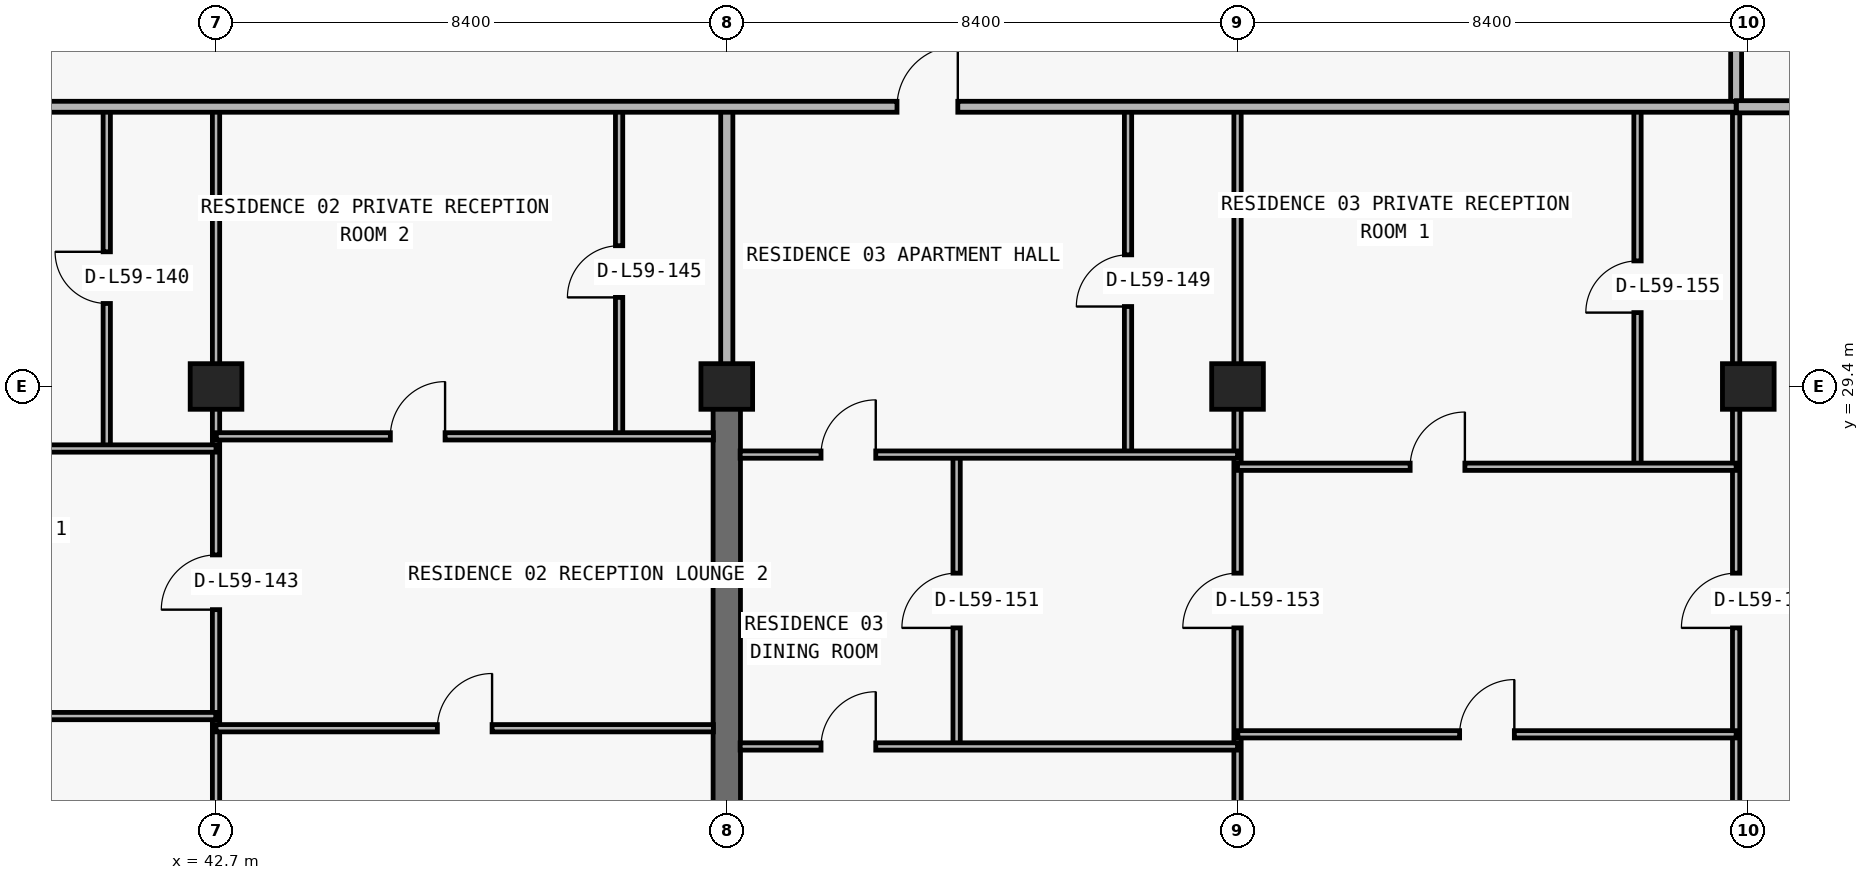
"""IFC4 building model, lengths in metres.
Left out: names, types, materials, properties, quantities, classifications, styles, units other than length and angle.
Written with IfcOpenShell. Run it as: python <this file> out.ifc"""

import sys

from ifc_helpers import new_model, si_unit, direction, frame, frame_2d, origin, origin_2d, place, context, subcontext, project, spatial, rectangle, extrude, element, fill, save


model = new_model("IFC4")
c1 = context("Model", 3, precision=1e-05, world=origin(), true_north=direction((0.0, 1.0)))
c2 = subcontext(c1, "Body", "Model", "MODEL_VIEW")
j1 = project(units=[si_unit("LENGTHUNIT", "METRE"), si_unit("PLANEANGLEUNIT", "RADIAN")], contexts=[c1])
p1 = place(None, origin())
s1 = spatial("IfcSite", under=j1, at=p1, CompositionType="ELEMENT")
p2 = place(p1, origin())
s2 = spatial("IfcBuilding", under=s1, at=p2, CompositionType="ELEMENT")
p3 = place(p2, frame((0.0, 0.0, 211.5)))
s3 = spatial("IfcBuildingStorey", under=s2, at=p3, CompositionType="ELEMENT", Elevation=211.5)
for number, where, z_axis, x_axis in (
    (1, (42.7, 29.4, 0.0), (0.0, 0.0, 1.0), (1.0, 0.0, 0.0)),
    (2, (51.1, 29.4, 0.0), (0.0, 0.0, 1.0), (1.0, 0.0, 0.0)),
    (3, (59.5, 29.4, 0.0), (0.0, 0.0, 1.0), (1.0, 0.0, 0.0)),
    (4, (67.9, 29.4, 0.0), (0.0, 0.0, 1.0), (1.0, 0.0, 0.0)),
):
    element("IfcColumn", number, at=place(p3, frame(where, z_axis=z_axis, x_axis=x_axis)), inside=s3, PredefinedType="COLUMN", context=c2, shape_type="SweptSolid", body=[
        extrude(rectangle(XDim=0.85, YDim=0.75, at=origin_2d()), origin(), (0.0, 0.0, 1.0), 3.05),
    ])
p4 = place(p3, frame((51.1, 20.8, 0.0), z_axis=(0.0, 0.0, 1.0), x_axis=(0.0, 1.0, 0.0)))
e5 = element("IfcWall", 5, at=p4, inside=s3, PredefinedType="SHEAR", context=c2, shape_type="SweptSolid", body=[
    extrude(rectangle(XDim=8.6, YDim=0.45, at=frame_2d((4.3, 0.0))), origin(), (0.0, 0.0, 1.0), 3.05),
])
p5 = place(p3, frame((40.903, 28.38, 0.0), z_axis=(0.0, 0.0, 1.0), x_axis=(0.0, 1.0, 0.0)))
e6 = element("IfcWall", 6, at=p5, inside=s3, PredefinedType="PARTITIONING", context=c2, shape_type="SweptSolid", body=[
    extrude(rectangle(XDim=5.62, YDim=0.12, at=frame_2d((2.81, 0.0))), origin(), (0.0, 0.0, 1.0), 3.05),
])
p6 = place(p5, frame((2.385, 0.0, 0.0)))
e7 = element("IfcOpeningElement", 7, at=p6, cuts=e6, PredefinedType="OPENING", context=c2, shape_type="SweptSolid", body=[
    extrude(rectangle(XDim=0.85, YDim=2.1, at=frame_2d((0.425, 1.05))), frame((0.0, 0.07, 0.0), z_axis=(0.0, -1.0, 0.0), x_axis=(1.0, 0.0, 0.0)), (0.0, 0.0, 1.0), 0.14),
])
p7 = place(p3, frame((42.7, 11.24, 0.0), z_axis=(0.0, 0.0, 1.0), x_axis=(0.0, 1.0, 0.0)))
e8 = element("IfcWall", 8, at=p7, inside=s3, PredefinedType="PARTITIONING", context=c2, shape_type="SweptSolid", body=[
    extrude(rectangle(XDim=22.76, YDim=0.12, at=frame_2d((11.38, 0.0))), origin(), (0.0, 0.0, 1.0), 2.263),
])
p8 = place(p7, frame((14.49, 0.0, 0.0)))
e9 = element("IfcOpeningElement", 9, at=p8, cuts=e8, PredefinedType="OPENING", context=c2, shape_type="SweptSolid", body=[
    extrude(rectangle(XDim=0.9, YDim=2.15, at=frame_2d((0.45, 1.075))), frame((0.0, 0.07, 0.0), z_axis=(0.0, -1.0, 0.0), x_axis=(1.0, 0.0, 0.0)), (0.0, 0.0, 1.0), 0.14),
])
p9 = place(p3, frame((49.329, 28.58, 0.0), z_axis=(0.0, 0.0, 1.0), x_axis=(0.0, 1.0, 0.0)))
e10 = element("IfcWall", 10, at=p9, inside=s3, PredefinedType="PARTITIONING", context=c2, shape_type="SweptSolid", body=[
    extrude(rectangle(XDim=5.42, YDim=0.12, at=frame_2d((2.71, 0.0))), origin(), (0.0, 0.0, 1.0), 3.05),
])
p10 = place(p9, frame((2.285, 0.0, 0.0)))
e11 = element("IfcOpeningElement", 11, at=p10, cuts=e10, PredefinedType="OPENING", context=c2, shape_type="SweptSolid", body=[
    extrude(rectangle(XDim=0.85, YDim=2.1, at=frame_2d((0.425, 1.05))), frame((0.0, 0.07, 0.0), z_axis=(0.0, -1.0, 0.0), x_axis=(1.0, 0.0, 0.0)), (0.0, 0.0, 1.0), 0.14),
])
p11 = place(p3, frame((51.1, 29.405, 0.0), z_axis=(0.0, 0.0, 1.0), x_axis=(0.0, 1.0, 0.0)))
e12 = element("IfcWall", 12, at=p11, inside=s3, PredefinedType="PARTITIONING", context=c2, shape_type="SweptSolid", body=[
    extrude(rectangle(XDim=4.595, YDim=0.2, at=frame_2d((2.297, 0.0))), origin(), (0.0, 0.0, 1.0), 2.335),
])
p12 = place(p3, frame((54.88, 23.48, 0.0), z_axis=(0.0, 0.0, 1.0), x_axis=(0.0, 1.0, 0.0)))
e13 = element("IfcWall", 13, at=p12, inside=s3, PredefinedType="PARTITIONING", context=c2, shape_type="SweptSolid", body=[
    extrude(rectangle(XDim=4.8, YDim=0.12, at=frame_2d((2.4, 0.0))), origin(), (0.0, 0.0, 1.0), 3.05),
])
p13 = place(p12, frame((1.95, 0.0, 0.0)))
e14 = element("IfcOpeningElement", 14, at=p13, cuts=e13, PredefinedType="OPENING", context=c2, shape_type="SweptSolid", body=[
    extrude(rectangle(XDim=0.9, YDim=2.15, at=frame_2d((0.45, 1.075))), frame((0.0, 0.07, 0.0), z_axis=(0.0, -1.0, 0.0), x_axis=(1.0, 0.0, 0.0)), (0.0, 0.0, 1.0), 0.14),
])
p14 = place(p3, frame((57.699, 28.28, 0.0), z_axis=(0.0, 0.0, 1.0), x_axis=(0.0, 1.0, 0.0)))
e15 = element("IfcWall", 15, at=p14, inside=s3, PredefinedType="PARTITIONING", context=c2, shape_type="SweptSolid", body=[
    extrude(rectangle(XDim=5.72, YDim=0.12, at=frame_2d((2.86, 0.0))), origin(), (0.0, 0.0, 1.0), 3.05),
])
p15 = place(p14, frame((2.435, 0.0, 0.0)))
e16 = element("IfcOpeningElement", 16, at=p15, cuts=e15, PredefinedType="OPENING", context=c2, shape_type="SweptSolid", body=[
    extrude(rectangle(XDim=0.85, YDim=2.1, at=frame_2d((0.425, 1.05))), frame((0.0, 0.07, 0.0), z_axis=(0.0, -1.0, 0.0), x_axis=(1.0, 0.0, 0.0)), (0.0, 0.0, 1.0), 0.14),
])
p16 = place(p3, frame((59.5, 11.24, 0.0), z_axis=(0.0, 0.0, 1.0), x_axis=(0.0, 1.0, 0.0)))
e17 = element("IfcWall", 17, at=p16, inside=s3, PredefinedType="PARTITIONING", context=c2, shape_type="SweptSolid", body=[
    extrude(rectangle(XDim=22.76, YDim=0.12, at=frame_2d((11.38, 0.0))), origin(), (0.0, 0.0, 1.0), 2.263),
])
p17 = place(p16, frame((14.19, 0.0, 0.0)))
e18 = element("IfcOpeningElement", 18, at=p17, cuts=e17, PredefinedType="OPENING", context=c2, shape_type="SweptSolid", body=[
    extrude(rectangle(XDim=0.9, YDim=2.15, at=frame_2d((0.45, 1.075))), frame((0.0, 0.07, 0.0), z_axis=(0.0, -1.0, 0.0), x_axis=(1.0, 0.0, 0.0)), (0.0, 0.0, 1.0), 0.14),
])
p18 = place(p3, frame((66.078, 28.08, 0.0), z_axis=(0.0, 0.0, 1.0), x_axis=(0.0, 1.0, 0.0)))
e19 = element("IfcWall", 19, at=p18, inside=s3, PredefinedType="PARTITIONING", context=c2, shape_type="SweptSolid", body=[
    extrude(rectangle(XDim=5.92, YDim=0.12, at=frame_2d((2.96, 0.0))), origin(), (0.0, 0.0, 1.0), 3.05),
])
p19 = place(p18, frame((2.535, 0.0, 0.0)))
e20 = element("IfcOpeningElement", 20, at=p19, cuts=e19, PredefinedType="OPENING", context=c2, shape_type="SweptSolid", body=[
    extrude(rectangle(XDim=0.85, YDim=2.1, at=frame_2d((0.425, 1.05))), frame((0.0, 0.07, 0.0), z_axis=(0.0, -1.0, 0.0), x_axis=(1.0, 0.0, 0.0)), (0.0, 0.0, 1.0), 0.14),
])
p20 = place(p3, frame((67.7, 11.32, 0.0), z_axis=(0.0, 0.0, 1.0), x_axis=(0.0, 1.0, 0.0)))
e21 = element("IfcWall", 21, at=p20, inside=s3, PredefinedType="PARTITIONING", context=c2, shape_type="SweptSolid", body=[
    extrude(rectangle(XDim=22.68, YDim=0.12, at=frame_2d((11.34, 0.0))), origin(), (0.0, 0.0, 1.0), 2.263),
])
p21 = place(p20, frame((14.11, 0.0, 0.0)))
e22 = element("IfcOpeningElement", 22, at=p21, cuts=e21, PredefinedType="OPENING", context=c2, shape_type="SweptSolid", body=[
    extrude(rectangle(XDim=0.9, YDim=2.15, at=frame_2d((0.45, 1.075))), frame((0.0, 0.07, 0.0), z_axis=(0.0, -1.0, 0.0), x_axis=(1.0, 0.0, 0.0)), (0.0, 0.0, 1.0), 0.14),
])
p22 = place(p3, frame((67.7, 34.005, 0.0), z_axis=(0.0, 0.0, 1.0), x_axis=(0.0, 1.0, 0.0)))
e23 = element("IfcWall", 23, at=p22, inside=s3, PredefinedType="PARTITIONING", context=c2, shape_type="SweptSolid", body=[
    extrude(rectangle(XDim=2.995, YDim=0.18, at=frame_2d((1.498, 0.0))), origin(), (0.0, 0.0, 1.0), 2.263),
])
p23 = place(p3, frame((51.32, 23.48, 0.0), z_axis=(0.0, 0.0, 1.0), x_axis=(1.0, 0.0, 0.0)))
e24 = element("IfcWall", 24, at=p23, inside=s3, PredefinedType="PARTITIONING", context=c2, shape_type="SweptSolid", body=[
    extrude(rectangle(XDim=8.18, YDim=0.12, at=frame_2d((4.09, 0.0))), origin(), (0.0, 0.0, 1.0), 3.05),
])
p24 = place(p23, frame((1.33, 0.0, 0.0)))
e25 = element("IfcOpeningElement", 25, at=p24, cuts=e24, PredefinedType="OPENING", context=c2, shape_type="SweptSolid", body=[
    extrude(rectangle(XDim=0.9, YDim=2.15, at=frame_2d((0.45, 1.075))), frame((0.0, 0.07, 0.0), z_axis=(0.0, -1.0, 0.0), x_axis=(1.0, 0.0, 0.0)), (0.0, 0.0, 1.0), 0.14),
])
p25 = place(p3, frame((59.505, 23.68, 0.0), z_axis=(0.0, 0.0, 1.0), x_axis=(1.0, 0.0, 0.0)))
e26 = element("IfcWall", 26, at=p25, inside=s3, PredefinedType="PARTITIONING", context=c2, shape_type="SweptSolid", body=[
    extrude(rectangle(XDim=8.195, YDim=0.12, at=frame_2d((4.098, 0.0))), origin(), (0.0, 0.0, 1.0), 3.05),
])
p26 = place(p25, frame((3.647, 0.0, 0.0)))
e27 = element("IfcOpeningElement", 27, at=p26, cuts=e26, PredefinedType="OPENING", context=c2, shape_type="SweptSolid", body=[
    extrude(rectangle(XDim=0.9, YDim=2.15, at=frame_2d((0.45, 1.075))), frame((0.0, 0.07, 0.0), z_axis=(0.0, -1.0, 0.0), x_axis=(1.0, 0.0, 0.0)), (0.0, 0.0, 1.0), 0.14),
])
p27 = place(p3, frame((42.7, 23.78, 0.0), z_axis=(0.0, 0.0, 1.0), x_axis=(1.0, 0.0, 0.0)))
e28 = element("IfcWall", 28, at=p27, inside=s3, PredefinedType="PARTITIONING", context=c2, shape_type="SweptSolid", body=[
    extrude(rectangle(XDim=8.18, YDim=0.12, at=frame_2d((4.09, 0.0))), origin(), (0.0, 0.0, 1.0), 3.05),
])
p28 = place(p27, frame((3.64, 0.0, 0.0)))
e29 = element("IfcOpeningElement", 29, at=p28, cuts=e28, PredefinedType="OPENING", context=c2, shape_type="SweptSolid", body=[
    extrude(rectangle(XDim=0.9, YDim=2.15, at=frame_2d((0.45, 1.075))), frame((0.0, 0.07, 0.0), z_axis=(0.0, -1.0, 0.0), x_axis=(1.0, 0.0, 0.0)), (0.0, 0.0, 1.0), 0.14),
])
p29 = place(p3, frame((35.105, 23.98, 0.0), z_axis=(0.0, 0.0, 1.0), x_axis=(1.0, 0.0, 0.0)))
e30 = element("IfcWall", 30, at=p29, inside=s3, PredefinedType="PARTITIONING", context=c2, shape_type="SweptSolid", body=[
    extrude(rectangle(XDim=7.59, YDim=0.12, at=frame_2d((3.795, 0.0))), origin(), (0.0, 0.0, 1.0), 3.05),
])
p30 = place(p29, frame((3.345, 0.0, 0.0)))
e31 = element("IfcOpeningElement", 31, at=p30, cuts=e30, PredefinedType="OPENING", context=c2, shape_type="SweptSolid", body=[
    extrude(rectangle(XDim=0.9, YDim=2.15, at=frame_2d((0.45, 1.075))), frame((0.0, 0.07, 0.0), z_axis=(0.0, -1.0, 0.0), x_axis=(1.0, 0.0, 0.0)), (0.0, 0.0, 1.0), 0.14),
])
p31 = place(p3, frame((59.5, 28.08, 0.0), z_axis=(0.0, 0.0, 1.0), x_axis=(1.0, 0.0, 0.0)))
e32 = element("IfcWall", 32, at=p31, inside=s3, PredefinedType="PARTITIONING", context=c2, shape_type="SweptSolid", body=[
    extrude(rectangle(XDim=8.2, YDim=0.12, at=frame_2d((4.1, 0.0))), origin(), (0.0, 0.0, 1.0), 3.05),
])
p32 = place(p31, frame((2.839, 0.0, 0.0)))
e33 = element("IfcOpeningElement", 33, at=p32, cuts=e32, PredefinedType="OPENING", context=c2, shape_type="SweptSolid", body=[
    extrude(rectangle(XDim=0.9, YDim=2.15, at=frame_2d((0.45, 1.075))), frame((0.0, 0.07, 0.0), z_axis=(0.0, -1.0, 0.0), x_axis=(1.0, 0.0, 0.0)), (0.0, 0.0, 1.0), 0.14),
])
p33 = place(p3, frame((51.32, 28.28, 0.0), z_axis=(0.0, 0.0, 1.0), x_axis=(1.0, 0.0, 0.0)))
e34 = element("IfcWall", 34, at=p33, inside=s3, PredefinedType="PARTITIONING", context=c2, shape_type="SweptSolid", body=[
    extrude(rectangle(XDim=8.18, YDim=0.12, at=frame_2d((4.09, 0.0))), origin(), (0.0, 0.0, 1.0), 3.05),
])
p34 = place(p33, frame((1.33, 0.0, 0.0)))
e35 = element("IfcOpeningElement", 35, at=p34, cuts=e34, PredefinedType="OPENING", context=c2, shape_type="SweptSolid", body=[
    extrude(rectangle(XDim=0.9, YDim=2.15, at=frame_2d((0.45, 1.075))), frame((0.0, 0.07, 0.0), z_axis=(0.0, -1.0, 0.0), x_axis=(1.0, 0.0, 0.0)), (0.0, 0.0, 1.0), 0.14),
])
p35 = place(p3, frame((35.1, 28.38, 0.0), z_axis=(0.0, 0.0, 1.0), x_axis=(1.0, 0.0, 0.0)))
e36 = element("IfcWall", 36, at=p35, inside=s3, PredefinedType="PARTITIONING", context=c2, shape_type="SweptSolid", body=[
    extrude(rectangle(XDim=7.6, YDim=0.12, at=frame_2d((3.8, 0.0))), origin(), (0.0, 0.0, 1.0), 3.05),
])
p36 = place(p35, frame((2.451, 0.0, 0.0)))
e37 = element("IfcOpeningElement", 37, at=p36, cuts=e36, PredefinedType="OPENING", context=c2, shape_type="SweptSolid", body=[
    extrude(rectangle(XDim=0.9, YDim=2.15, at=frame_2d((0.45, 1.075))), frame((0.0, 0.07, 0.0), z_axis=(0.0, -1.0, 0.0), x_axis=(1.0, 0.0, 0.0)), (0.0, 0.0, 1.0), 0.14),
])
p37 = place(p3, frame((42.705, 28.58, 0.0), z_axis=(0.0, 0.0, 1.0), x_axis=(1.0, 0.0, 0.0)))
e38 = element("IfcWall", 38, at=p37, inside=s3, PredefinedType="PARTITIONING", context=c2, shape_type="SweptSolid", body=[
    extrude(rectangle(XDim=8.175, YDim=0.12, at=frame_2d((4.087, 0.0))), origin(), (0.0, 0.0, 1.0), 3.05),
])
p38 = place(p37, frame((2.862, 0.0, 0.0)))
e39 = element("IfcOpeningElement", 39, at=p38, cuts=e38, PredefinedType="OPENING", context=c2, shape_type="SweptSolid", body=[
    extrude(rectangle(XDim=0.9, YDim=2.15, at=frame_2d((0.45, 1.075))), frame((0.0, 0.07, 0.0), z_axis=(0.0, -1.0, 0.0), x_axis=(1.0, 0.0, 0.0)), (0.0, 0.0, 1.0), 0.14),
])
p39 = place(p3, frame((26.7, 34.0, 0.0), z_axis=(0.0, 0.0, 1.0), x_axis=(1.0, 0.0, 0.0)))
e40 = element("IfcWall", 40, at=p39, inside=s3, PredefinedType="PARTITIONING", context=c2, shape_type="SweptSolid", body=[
    extrude(rectangle(XDim=41.0, YDim=0.18, at=frame_2d((20.5, 0.0))), origin(), (0.0, 0.0, 1.0), 3.05),
])
p40 = place(p39, frame((2.796, 0.0, 0.0)))
e41 = element("IfcOpeningElement", 41, at=p40, cuts=e40, PredefinedType="OPENING", context=c2, shape_type="SweptSolid", body=[
    extrude(rectangle(XDim=1.0, YDim=2.2, at=frame_2d((0.5, 1.1))), frame((0.0, 0.1, 0.0), z_axis=(0.0, -1.0, 0.0), x_axis=(1.0, 0.0, 0.0)), (0.0, 0.0, 1.0), 0.2),
])
p41 = place(p39, frame((27.199, 0.0, 0.0)))
e42 = element("IfcOpeningElement", 42, at=p41, cuts=e40, PredefinedType="OPENING", context=c2, shape_type="SweptSolid", body=[
    extrude(rectangle(XDim=1.0, YDim=2.2, at=frame_2d((0.5, 1.1))), frame((0.0, 0.1, 0.0), z_axis=(0.0, -1.0, 0.0), x_axis=(1.0, 0.0, 0.0)), (0.0, 0.0, 1.0), 0.2),
])
p42 = place(p3, frame((67.705, 34.0, 0.0), z_axis=(0.0, 0.0, 1.0), x_axis=(1.0, 0.0, 0.0)))
e43 = element("IfcWall", 43, at=p42, inside=s3, PredefinedType="PARTITIONING", context=c2, shape_type="SweptSolid", body=[
    extrude(rectangle(XDim=3.7, YDim=0.2, at=frame_2d((1.85, 0.0))), origin(), (0.0, 0.0, 1.0), 3.05),
])
p43 = place(p6, origin())
e44 = element("IfcDoor", 44, at=p43, inside=s3, OperationType="SINGLE_SWING_RIGHT", PredefinedType="DOOR", context=c2, shape_type="SweptSolid", body=[
    extrude(rectangle(XDim=0.85, YDim=2.1, at=frame_2d((0.425, 1.05))), frame((0.0, 0.025, 0.0), z_axis=(0.0, -1.0, 0.0), x_axis=(1.0, 0.0, 0.0)), (0.0, 0.0, 1.0), 0.05),
])
fill(e7, e44)
p44 = place(p8, origin())
e45 = element("IfcDoor", 45, at=p44, inside=s3, OperationType="SINGLE_SWING_LEFT", PredefinedType="DOOR", context=c2, shape_type="SweptSolid", body=[
    extrude(rectangle(XDim=0.9, YDim=2.15, at=frame_2d((0.45, 1.075))), frame((0.0, 0.025, 0.0), z_axis=(0.0, -1.0, 0.0), x_axis=(1.0, 0.0, 0.0)), (0.0, 0.0, 1.0), 0.05),
])
fill(e9, e45)
p45 = place(p38, origin())
e46 = element("IfcDoor", 46, at=p45, inside=s3, OperationType="SINGLE_SWING_RIGHT", PredefinedType="DOOR", context=c2, shape_type="SweptSolid", body=[
    extrude(rectangle(XDim=0.9, YDim=2.15, at=frame_2d((0.45, 1.075))), frame((0.0, 0.025, 0.0), z_axis=(0.0, -1.0, 0.0), x_axis=(1.0, 0.0, 0.0)), (0.0, 0.0, 1.0), 0.05),
])
fill(e39, e46)
p46 = place(p10, origin())
e47 = element("IfcDoor", 47, at=p46, inside=s3, OperationType="SINGLE_SWING_LEFT", PredefinedType="DOOR", context=c2, shape_type="SweptSolid", body=[
    extrude(rectangle(XDim=0.85, YDim=2.1, at=frame_2d((0.425, 1.05))), frame((0.0, 0.025, 0.0), z_axis=(0.0, -1.0, 0.0), x_axis=(1.0, 0.0, 0.0)), (0.0, 0.0, 1.0), 0.05),
])
fill(e11, e47)
p47 = place(p28, origin())
e48 = element("IfcDoor", 48, at=p47, inside=s3, OperationType="SINGLE_SWING_RIGHT", PredefinedType="DOOR", context=c2, shape_type="SweptSolid", body=[
    extrude(rectangle(XDim=0.9, YDim=2.15, at=frame_2d((0.45, 1.075))), frame((0.0, 0.025, 0.0), z_axis=(0.0, -1.0, 0.0), x_axis=(1.0, 0.0, 0.0)), (0.0, 0.0, 1.0), 0.05),
])
fill(e29, e48)
p48 = place(p41, origin())
e49 = element("IfcDoor", 49, at=p48, inside=s3, OperationType="SINGLE_SWING_RIGHT", PredefinedType="DOOR", context=c2, shape_type="SweptSolid", body=[
    extrude(rectangle(XDim=1.0, YDim=2.2, at=frame_2d((0.5, 1.1))), frame((0.0, 0.025, 0.0), z_axis=(0.0, -1.0, 0.0), x_axis=(1.0, 0.0, 0.0)), (0.0, 0.0, 1.0), 0.05),
])
fill(e42, e49)
p49 = place(p15, origin())
e50 = element("IfcDoor", 50, at=p49, inside=s3, OperationType="SINGLE_SWING_LEFT", PredefinedType="DOOR", context=c2, shape_type="SweptSolid", body=[
    extrude(rectangle(XDim=0.85, YDim=2.1, at=frame_2d((0.425, 1.05))), frame((0.0, 0.025, 0.0), z_axis=(0.0, -1.0, 0.0), x_axis=(1.0, 0.0, 0.0)), (0.0, 0.0, 1.0), 0.05),
])
fill(e16, e50)
p50 = place(p34, origin())
e51 = element("IfcDoor", 51, at=p50, inside=s3, OperationType="SINGLE_SWING_RIGHT", PredefinedType="DOOR", context=c2, shape_type="SweptSolid", body=[
    extrude(rectangle(XDim=0.9, YDim=2.15, at=frame_2d((0.45, 1.075))), frame((0.0, 0.025, 0.0), z_axis=(0.0, -1.0, 0.0), x_axis=(1.0, 0.0, 0.0)), (0.0, 0.0, 1.0), 0.05),
])
fill(e35, e51)
p51 = place(p13, origin())
e52 = element("IfcDoor", 52, at=p51, inside=s3, OperationType="SINGLE_SWING_LEFT", PredefinedType="DOOR", context=c2, shape_type="SweptSolid", body=[
    extrude(rectangle(XDim=0.9, YDim=2.15, at=frame_2d((0.45, 1.075))), frame((0.0, 0.025, 0.0), z_axis=(0.0, -1.0, 0.0), x_axis=(1.0, 0.0, 0.0)), (0.0, 0.0, 1.0), 0.05),
])
fill(e14, e52)
p52 = place(p24, origin())
e53 = element("IfcDoor", 53, at=p52, inside=s3, OperationType="SINGLE_SWING_RIGHT", PredefinedType="DOOR", context=c2, shape_type="SweptSolid", body=[
    extrude(rectangle(XDim=0.9, YDim=2.15, at=frame_2d((0.45, 1.075))), frame((0.0, 0.025, 0.0), z_axis=(0.0, -1.0, 0.0), x_axis=(1.0, 0.0, 0.0)), (0.0, 0.0, 1.0), 0.05),
])
fill(e25, e53)
p53 = place(p17, origin())
e54 = element("IfcDoor", 54, at=p53, inside=s3, OperationType="SINGLE_SWING_LEFT", PredefinedType="DOOR", context=c2, shape_type="SweptSolid", body=[
    extrude(rectangle(XDim=0.9, YDim=2.15, at=frame_2d((0.45, 1.075))), frame((0.0, 0.025, 0.0), z_axis=(0.0, -1.0, 0.0), x_axis=(1.0, 0.0, 0.0)), (0.0, 0.0, 1.0), 0.05),
])
fill(e18, e54)
p54 = place(p32, origin())
e55 = element("IfcDoor", 55, at=p54, inside=s3, OperationType="SINGLE_SWING_RIGHT", PredefinedType="DOOR", context=c2, shape_type="SweptSolid", body=[
    extrude(rectangle(XDim=0.9, YDim=2.15, at=frame_2d((0.45, 1.075))), frame((0.0, 0.025, 0.0), z_axis=(0.0, -1.0, 0.0), x_axis=(1.0, 0.0, 0.0)), (0.0, 0.0, 1.0), 0.05),
])
fill(e33, e55)
p55 = place(p19, origin())
e56 = element("IfcDoor", 56, at=p55, inside=s3, OperationType="SINGLE_SWING_LEFT", PredefinedType="DOOR", context=c2, shape_type="SweptSolid", body=[
    extrude(rectangle(XDim=0.85, YDim=2.1, at=frame_2d((0.425, 1.05))), frame((0.0, 0.025, 0.0), z_axis=(0.0, -1.0, 0.0), x_axis=(1.0, 0.0, 0.0)), (0.0, 0.0, 1.0), 0.05),
])
fill(e20, e56)
p56 = place(p26, origin())
e57 = element("IfcDoor", 57, at=p56, inside=s3, OperationType="SINGLE_SWING_RIGHT", PredefinedType="DOOR", context=c2, shape_type="SweptSolid", body=[
    extrude(rectangle(XDim=0.9, YDim=2.15, at=frame_2d((0.45, 1.075))), frame((0.0, 0.025, 0.0), z_axis=(0.0, -1.0, 0.0), x_axis=(1.0, 0.0, 0.0)), (0.0, 0.0, 1.0), 0.05),
])
fill(e27, e57)
p57 = place(p21, origin())
e58 = element("IfcDoor", 58, at=p57, inside=s3, OperationType="SINGLE_SWING_LEFT", PredefinedType="DOOR", context=c2, shape_type="SweptSolid", body=[
    extrude(rectangle(XDim=0.9, YDim=2.15, at=frame_2d((0.45, 1.075))), frame((0.0, 0.025, 0.0), z_axis=(0.0, -1.0, 0.0), x_axis=(1.0, 0.0, 0.0)), (0.0, 0.0, 1.0), 0.05),
])
fill(e22, e58)
save(model, sys.argv[1])
